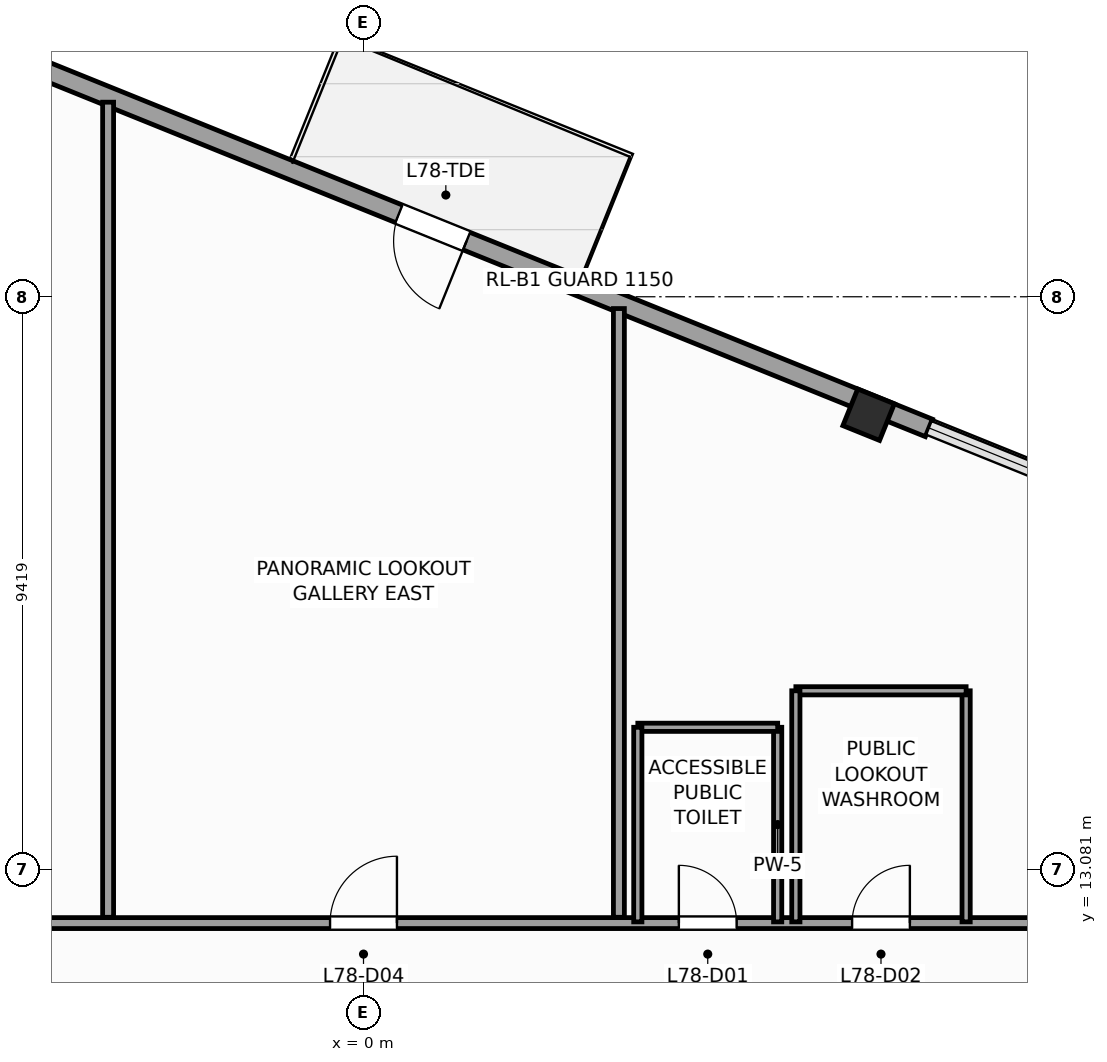
"""IFC4 building model, lengths in metres.
Left out: names, types, materials, properties, quantities, classifications, styles, units other than length and angle.
Written with IfcOpenShell. Run it as: python <this file> out.ifc"""

import sys

from ifc_helpers import new_model, si_unit, direction, frame, frame_2d, origin, origin_2d, place, context, subcontext, project, spatial, rectangle, extrude, source, transform, mapped, element, fill, save


model = new_model("IFC4")
c1 = context("Model", 3, precision=1e-05, world=origin(), true_north=direction((0.0, 1.0)))
c2 = subcontext(c1, "Body", "Model", "MODEL_VIEW")
j1 = project(units=[si_unit("LENGTHUNIT", "METRE"), si_unit("PLANEANGLEUNIT", "RADIAN")], contexts=[c1])
p1 = place(None, origin())
s1 = spatial("IfcSite", under=j1, at=p1, CompositionType="ELEMENT")
p2 = place(p1, origin())
s2 = spatial("IfcBuilding", under=s1, at=p2, CompositionType="ELEMENT")
p3 = place(p2, frame((0.0, 0.0, 316.8)))
s3 = spatial("IfcBuildingStorey", under=s2, at=p3, CompositionType="ELEMENT", Elevation=316.8)
m1 = source(origin(), c2, "Body", "SweptSolid", [
    extrude(rectangle(XDim=0.65, YDim=0.65, at=origin_2d()), origin(), (0.0, 0.0, 1.0), 4.8),
])
p4 = place(p3, frame((8.307, 20.56, 0.0), z_axis=(0.0, 0.0, 1.0), x_axis=(0.374606593416, 0.927183854567, 0.0)))
e1 = element("IfcColumn", 1, at=p4, inside=s3, PredefinedType="COLUMN", context=c2, shape_type="MappedRepresentation", body=[
    mapped(m1, transform((0.0, 0.0, 0.0), scale=1.0)),
])
p5 = place(p3, frame((9.298, 20.343, 0.0), z_axis=(0.0, 0.0, 1.0), x_axis=(-0.927183654967, 0.374607087443, 0.0)))
e2 = element("IfcWall", 2, at=p5, inside=s3, PredefinedType="STANDARD", context=c2, shape_type="SweptSolid", body=[
    extrude(rectangle(XDim=17.655, YDim=0.31, at=frame_2d((8.828, 0.0))), origin(), (0.0, 0.0, 1.0), 2.92),
])
p6 = place(p5, frame((8.2, 0.0, 0.0)))
e3 = element("IfcOpeningElement", 3, at=p6, cuts=e2, PredefinedType="OPENING", context=c2, shape_type="SweptSolid", body=[
    extrude(rectangle(XDim=1.2, YDim=2.3, at=frame_2d((0.6, 1.15))), frame((0.0, 0.165, 0.0), z_axis=(0.0, -1.0, 0.0), x_axis=(1.0, 0.0, 0.0)), (0.0, 0.0, 1.0), 0.33),
])
p7 = place(p3, frame((-11.9, 12.2, 0.0), z_axis=(0.0, 0.0, 1.0), x_axis=(1.0, 0.0, 0.0)))
e4 = element("IfcWall", 4, at=p7, inside=s3, PredefinedType="PARTITIONING", context=c2, shape_type="SweptSolid", body=[
    extrude(rectangle(XDim=24.1, YDim=0.18, at=frame_2d((12.05, 0.0))), origin(), (0.0, 0.0, 1.0), 4.5),
])
p8 = place(p7, frame((17.086, 0.0, 0.0)))
e5 = element("IfcOpeningElement", 5, at=p8, cuts=e4, PredefinedType="OPENING", context=c2, shape_type="SweptSolid", body=[
    extrude(rectangle(XDim=0.95, YDim=2.1, at=frame_2d((0.475, 1.05))), frame((0.0, 0.1, 0.0), z_axis=(0.0, -1.0, 0.0), x_axis=(1.0, 0.0, 0.0)), (0.0, 0.0, 1.0), 0.2),
])
p9 = place(p7, frame((19.935, 0.0, 0.0)))
e6 = element("IfcOpeningElement", 6, at=p9, cuts=e4, PredefinedType="OPENING", context=c2, shape_type="SweptSolid", body=[
    extrude(rectangle(XDim=0.95, YDim=2.1, at=frame_2d((0.475, 1.05))), frame((0.0, 0.1, 0.0), z_axis=(0.0, -1.0, 0.0), x_axis=(1.0, 0.0, 0.0)), (0.0, 0.0, 1.0), 0.2),
])
p10 = place(p7, frame((11.35, 0.0, 0.0)))
e7 = element("IfcOpeningElement", 7, at=p10, cuts=e4, PredefinedType="OPENING", context=c2, shape_type="SweptSolid", body=[
    extrude(rectangle(XDim=1.1, YDim=2.2, at=frame_2d((0.55, 1.1))), frame((0.0, 0.1, 0.0), z_axis=(0.0, -1.0, 0.0), x_axis=(1.0, 0.0, 0.0)), (0.0, 0.0, 1.0), 0.2),
])
p11 = place(p3, frame((-4.2, 12.295, 0.0), z_axis=(0.0, 0.0, 1.0), x_axis=(0.0, 1.0, 0.0)))
e8 = element("IfcWall", 8, at=p11, inside=s3, PredefinedType="PARTITIONING", context=c2, shape_type="SweptSolid", body=[
    extrude(rectangle(XDim=13.405, YDim=0.18, at=frame_2d((6.702, 0.0))), origin(), (0.0, 0.0, 1.0), 4.5),
])
p12 = place(p3, frame((4.2, 12.295, 0.0), z_axis=(0.0, 0.0, 1.0), x_axis=(0.0, 1.0, 0.0)))
e9 = element("IfcWall", 9, at=p12, inside=s3, PredefinedType="PARTITIONING", context=c2, shape_type="SweptSolid", body=[
    extrude(rectangle(XDim=10.011, YDim=0.18, at=frame_2d((5.005, 0.0))), origin(), (0.0, 0.0, 1.0), 4.5),
])
p13 = place(p3, frame((6.811, 12.22, 0.0), z_axis=(0.0, 0.0, 1.0), x_axis=(0.0, 1.0, 0.0)))
e10 = element("IfcWall", 10, at=p13, inside=s3, PredefinedType="PARTITIONING", context=c2, shape_type="SweptSolid", body=[
    extrude(rectangle(XDim=3.2, YDim=0.135, at=frame_2d((1.6, 0.0))), origin(), (0.0, 0.0, 1.0), 4.5),
])
p14 = place(p3, frame((4.511, 15.42, 0.0), z_axis=(0.0, 0.0, 1.0), x_axis=(1.0, 0.0, 0.0)))
e11 = element("IfcWall", 11, at=p14, inside=s3, PredefinedType="PARTITIONING", context=c2, shape_type="SweptSolid", body=[
    extrude(rectangle(XDim=2.3, YDim=0.135, at=frame_2d((1.15, 0.0))), origin(), (0.0, 0.0, 1.0), 4.5),
])
p15 = place(p3, frame((4.511, 12.22, 0.0), z_axis=(0.0, 0.0, 1.0), x_axis=(0.0, 1.0, 0.0)))
e12 = element("IfcWall", 12, at=p15, inside=s3, PredefinedType="PARTITIONING", context=c2, shape_type="SweptSolid", body=[
    extrude(rectangle(XDim=3.2, YDim=0.135, at=frame_2d((1.6, 0.0))), origin(), (0.0, 0.0, 1.0), 4.5),
])
p16 = place(p3, frame((9.91, 12.22, 0.0), z_axis=(0.0, 0.0, 1.0), x_axis=(0.0, 1.0, 0.0)))
e13 = element("IfcWall", 13, at=p16, inside=s3, PredefinedType="PARTITIONING", context=c2, shape_type="SweptSolid", body=[
    extrude(rectangle(XDim=3.8, YDim=0.135, at=frame_2d((1.9, 0.0))), origin(), (0.0, 0.0, 1.0), 4.5),
])
p17 = place(p3, frame((7.11, 16.02, 0.0), z_axis=(0.0, 0.0, 1.0), x_axis=(1.0, 0.0, 0.0)))
e14 = element("IfcWall", 14, at=p17, inside=s3, PredefinedType="PARTITIONING", context=c2, shape_type="SweptSolid", body=[
    extrude(rectangle(XDim=2.8, YDim=0.135, at=frame_2d((1.4, 0.0))), origin(), (0.0, 0.0, 1.0), 2.95),
])
p18 = place(p3, frame((7.11, 12.22, 0.0), z_axis=(0.0, 0.0, 1.0), x_axis=(0.0, 1.0, 0.0)))
e15 = element("IfcWall", 15, at=p18, inside=s3, PredefinedType="PARTITIONING", context=c2, shape_type="SweptSolid", body=[
    extrude(rectangle(XDim=3.8, YDim=0.135, at=frame_2d((1.9, 0.0))), origin(), (0.0, 0.0, 1.0), 4.5),
])
m2 = source(origin(), c2, "Body", "SweptSolid", [
    extrude(rectangle(XDim=1.2, YDim=2.3, at=frame_2d((0.6, 1.15))), frame((0.0, 0.025, 0.0), z_axis=(0.0, -1.0, 0.0), x_axis=(1.0, 0.0, 0.0)), (0.0, 0.0, 1.0), 0.05),
])
p19 = place(p6, origin())
e16 = element("IfcDoor", 16, at=p19, inside=s3, OperationType="SINGLE_SWING_LEFT", PredefinedType="DOOR", context=c2, shape_type="MappedRepresentation", body=[
    mapped(m2, transform((0.0, 0.0, 0.0), scale=1.0)),
])
fill(e3, e16)
m3 = source(origin(), c2, "Body", "SweptSolid", [
    extrude(rectangle(XDim=0.95, YDim=2.1, at=frame_2d((0.475, 1.05))), frame((0.0, 0.025, 0.0), z_axis=(0.0, -1.0, 0.0), x_axis=(1.0, 0.0, 0.0)), (0.0, 0.0, 1.0), 0.05),
])
p20 = place(p8, origin())
e17 = element("IfcDoor", 17, at=p20, inside=s3, OperationType="SINGLE_SWING_LEFT", PredefinedType="DOOR", context=c2, shape_type="MappedRepresentation", body=[
    mapped(m3, transform((0.0, 0.0, 0.0), scale=1.0)),
])
fill(e5, e17)
p21 = place(p9, origin())
e18 = element("IfcDoor", 18, at=p21, inside=s3, OperationType="SINGLE_SWING_RIGHT", PredefinedType="DOOR", context=c2, shape_type="MappedRepresentation", body=[
    mapped(m3, transform((0.0, 0.0, 0.0), scale=1.0)),
])
fill(e6, e18)
m4 = source(origin(), c2, "Body", "SweptSolid", [
    extrude(rectangle(XDim=1.1, YDim=2.2, at=frame_2d((0.55, 1.1))), frame((0.0, 0.025, 0.0), z_axis=(0.0, -1.0, 0.0), x_axis=(1.0, 0.0, 0.0)), (0.0, 0.0, 1.0), 0.05),
])
p22 = place(p10, origin())
e19 = element("IfcDoor", 19, at=p22, inside=s3, OperationType="SINGLE_SWING_RIGHT", PredefinedType="DOOR", context=c2, shape_type="MappedRepresentation", body=[
    mapped(m4, transform((0.0, 0.0, 0.0), scale=1.0)),
])
fill(e7, e19)
save(model, sys.argv[1])
